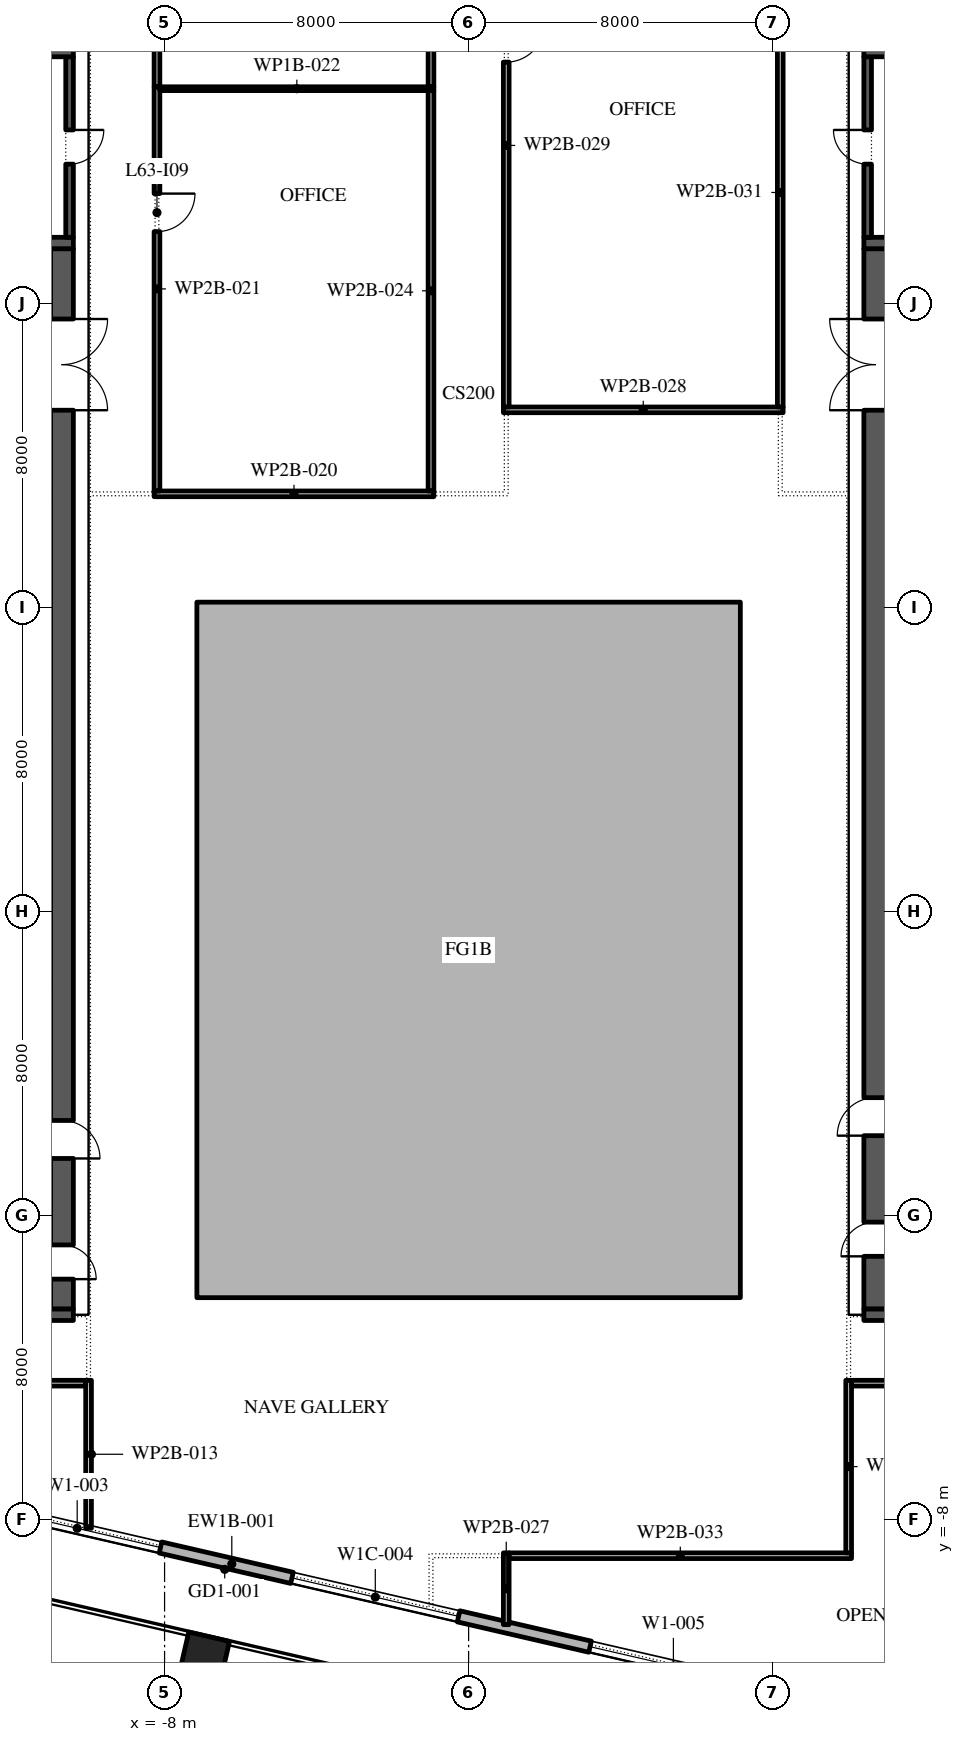
"""IFC4 building model, lengths in metres.
Left out: names, types, materials, properties, quantities, classifications, styles, units other than length and angle.
Written with IfcOpenShell. Run it as: python <this file> out.ifc"""

import sys

from ifc_helpers import new_model, si_unit, direction, frame, frame_2d, origin, origin_2d, place, context, subcontext, project, spatial, polyline, rectangle, outline, extrude, element, fill, save


model = new_model("IFC4")
c1 = context("Model", 3, precision=1e-05, world=origin(), true_north=direction((0.0, 1.0)))
c2 = subcontext(c1, "Body", "Model", "MODEL_VIEW")
j1 = project(units=[si_unit("LENGTHUNIT", "METRE"), si_unit("PLANEANGLEUNIT", "RADIAN")], contexts=[c1])
p1 = place(None, origin())
s1 = spatial("IfcSite", under=j1, at=p1, CompositionType="ELEMENT")
p2 = place(p1, origin())
s2 = spatial("IfcBuilding", under=s1, at=p2, CompositionType="ELEMENT")
p3 = place(p2, frame((0.0, 0.0, 289.2)))
s3 = spatial("IfcBuildingStorey", under=s2, at=p3, CompositionType="ELEMENT", Elevation=289.2)
p4 = place(p3, frame((-6.951, -11.608, 0.0), z_axis=(0.0, 0.0, 1.0), x_axis=(0.974370064785, -0.224951054344, 0.0)))
e1 = element("IfcColumn", 1, at=p4, inside=s3, PredefinedType="COLUMN", context=c2, shape_type="SweptSolid", body=[
    extrude(rectangle(XDim=1.1, YDim=1.1, at=origin_2d()), origin(), (0.0, 0.0, 1.0), 4.2),
])
p5 = place(p3, origin())
e2 = element("IfcWall", 2, at=p5, inside=s3, PredefinedType="STANDARD", context=c2, shape_type="SweptSolid", body=[
    extrude(outline(polyline([(-7.15, -2.15), (7.15, -2.15), (7.15, 16.15), (-7.15, 16.15), (-7.15, -2.15)]), holes=[polyline([(-7.0, -2.0), (-7.0, 16.0), (7.0, 16.0), (7.0, -2.0), (-7.0, -2.0)])]), origin(), (0.0, 0.0, 1.0), 3.95),
])
p6 = place(p3, frame((-29.616, -3.758, 0.0), z_axis=(0.0, 0.0, 1.0), x_axis=(0.974370532314, -0.224949029246, 0.0)))
e3 = element("IfcWall", 3, at=p6, inside=s3, PredefinedType="STANDARD", context=c2, shape_type="SweptSolid", body=[
    extrude(rectangle(XDim=48.0, YDim=0.3, at=frame_2d((24.0, 0.0))), origin(), (0.0, 0.0, 1.0), 3.95),
])
p7 = place(p6, frame((1.625, 0.0, 0.45)))
e4 = element("IfcOpeningElement", 4, at=p7, cuts=e3, PredefinedType="OPENING", context=c2, shape_type="SweptSolid", body=[
    extrude(rectangle(XDim=4.5, YDim=3.05, at=frame_2d((2.25, 1.525))), frame((0.0, 0.16, 0.0), z_axis=(0.0, -1.0, 0.0), x_axis=(1.0, 0.0, 0.0)), (0.0, 0.0, 1.0), 0.32),
])
p8 = place(p6, frame((10.575, 0.0, 0.0)))
e5 = element("IfcOpeningElement", 5, at=p8, cuts=e3, PredefinedType="OPENING", context=c2, shape_type="SweptSolid", body=[
    extrude(rectangle(XDim=2.4, YDim=3.5, at=frame_2d((1.2, 1.75))), frame((0.0, 0.16, 0.0), z_axis=(0.0, -1.0, 0.0), x_axis=(1.0, 0.0, 0.0)), (0.0, 0.0, 1.0), 0.32),
])
p9 = place(p6, frame((17.575, 0.0, 0.45)))
e6 = element("IfcOpeningElement", 6, at=p9, cuts=e3, PredefinedType="OPENING", context=c2, shape_type="SweptSolid", body=[
    extrude(rectangle(XDim=4.5, YDim=3.05, at=frame_2d((2.25, 1.525))), frame((0.0, 0.16, 0.0), z_axis=(0.0, -1.0, 0.0), x_axis=(1.0, 0.0, 0.0)), (0.0, 0.0, 1.0), 0.32),
])
p10 = place(p6, frame((25.625, 0.0, 0.45)))
e7 = element("IfcOpeningElement", 7, at=p10, cuts=e3, PredefinedType="OPENING", context=c2, shape_type="SweptSolid", body=[
    extrude(rectangle(XDim=4.5, YDim=2.9, at=frame_2d((2.25, 1.45))), frame((0.0, 0.16, 0.0), z_axis=(0.0, -1.0, 0.0), x_axis=(1.0, 0.0, 0.0)), (0.0, 0.0, 1.0), 0.32),
])
p11 = place(p6, frame((33.675, 0.0, 0.45)))
e8 = element("IfcOpeningElement", 8, at=p11, cuts=e3, PredefinedType="OPENING", context=c2, shape_type="SweptSolid", body=[
    extrude(rectangle(XDim=4.5, YDim=3.05, at=frame_2d((2.25, 1.525))), frame((0.0, 0.16, 0.0), z_axis=(0.0, -1.0, 0.0), x_axis=(1.0, 0.0, 0.0)), (0.0, 0.0, 1.0), 0.32),
])
p12 = place(p6, frame((42.775, 0.0, 0.0)))
e9 = element("IfcOpeningElement", 9, at=p12, cuts=e3, PredefinedType="OPENING", context=c2, shape_type="SweptSolid", body=[
    extrude(rectangle(XDim=2.4, YDim=3.15, at=frame_2d((1.2, 1.575))), frame((0.0, 0.16, 0.0), z_axis=(0.0, -1.0, 0.0), x_axis=(1.0, 0.0, 0.0)), (0.0, 0.0, 1.0), 0.32),
])
p13 = place(p3, frame((-10.7, -2.45, 0.0), z_axis=(0.0, 0.0, 1.0), x_axis=(0.0, 1.0, 0.0)))
e10 = element("IfcWall", 10, at=p13, inside=s3, PredefinedType="SHEAR", context=c2, shape_type="SweptSolid", body=[
    extrude(rectangle(XDim=27.9, YDim=0.6, at=frame_2d((13.95, 0.0))), origin(), (0.0, 0.0, 1.0), 3.95),
])
p14 = place(p13, frame((23.65, 0.0, 0.0)))
e11 = element("IfcOpeningElement", 11, at=p14, cuts=e10, PredefinedType="OPENING", context=c2, shape_type="SweptSolid", body=[
    extrude(rectangle(XDim=2.4, YDim=2.1, at=frame_2d((1.2, 1.05))), frame((0.0, 0.31, 0.0), z_axis=(0.0, -1.0, 0.0), x_axis=(1.0, 0.0, 0.0)), (0.0, 0.0, 1.0), 0.62),
])
p15 = place(p13, frame((0.788, 0.0, 0.0)))
e12 = element("IfcOpeningElement", 12, at=p15, cuts=e10, PredefinedType="OPENING", context=c2, shape_type="SweptSolid", body=[
    extrude(rectangle(XDim=0.9, YDim=2.1, at=frame_2d((0.45, 1.05))), frame((0.0, 0.31, 0.0), z_axis=(0.0, -1.0, 0.0), x_axis=(1.0, 0.0, 0.0)), (0.0, 0.0, 1.0), 0.62),
])
p16 = place(p13, frame((3.962, 0.0, 0.0)))
e13 = element("IfcOpeningElement", 13, at=p16, cuts=e10, PredefinedType="OPENING", context=c2, shape_type="SweptSolid", body=[
    extrude(rectangle(XDim=1.0, YDim=2.1, at=frame_2d((0.5, 1.05))), frame((0.0, 0.31, 0.0), z_axis=(0.0, -1.0, 0.0), x_axis=(1.0, 0.0, 0.0)), (0.0, 0.0, 1.0), 0.62),
])
for number, where, z_axis, x_axis in (
    (14, (-21.6, -2.6, 0.0), (0.0, 0.0, 1.0), (1.0, 0.0, 0.0)),
    (15, (-21.6, 25.6, 0.0), (0.0, 0.0, 1.0), (1.0, 0.0, 0.0)),
):
    element("IfcWall", number, at=place(p3, frame(where, z_axis=z_axis, x_axis=x_axis)), inside=s3, PredefinedType="SHEAR", context=c2, shape_type="SweptSolid", body=[
        extrude(rectangle(XDim=11.2, YDim=0.3, at=frame_2d((5.6, 0.0))), origin(), (0.0, 0.0, 1.0), 3.95),
    ])
p17 = place(p3, frame((-10.5, 25.75, 0.0), z_axis=(0.0, 0.0, 1.0), x_axis=(0.0, 1.0, 0.0)))
e16 = element("IfcWall", 16, at=p17, inside=s3, PredefinedType="SHEAR", context=c2, shape_type="SweptSolid", body=[
    extrude(rectangle(XDim=4.75, YDim=0.2, at=frame_2d((2.375, 0.0))), origin(), (0.0, 0.0, 1.0), 3.95),
])
p18 = place(p17, frame((1.925, 0.0, 0.0)))
e17 = element("IfcOpeningElement", 17, at=p18, cuts=e16, PredefinedType="OPENING", context=c2, shape_type="SweptSolid", body=[
    extrude(rectangle(XDim=0.9, YDim=2.1, at=frame_2d((0.45, 1.05))), frame((0.0, 0.11, 0.0), z_axis=(0.0, -1.0, 0.0), x_axis=(1.0, 0.0, 0.0)), (0.0, 0.0, 1.0), 0.22),
])
p19 = place(p3, frame((-21.6, 30.6, 0.0), z_axis=(0.0, 0.0, 1.0), x_axis=(1.0, 0.0, 0.0)))
e18 = element("IfcWall", 18, at=p19, inside=s3, PredefinedType="SHEAR", context=c2, shape_type="SweptSolid", body=[
    extrude(rectangle(XDim=11.2, YDim=0.2, at=frame_2d((5.6, 0.0))), origin(), (0.0, 0.0, 1.0), 3.95),
])
p20 = place(p3, frame((10.7, -2.45, 0.0), z_axis=(0.0, 0.0, 1.0), x_axis=(0.0, 1.0, 0.0)))
e19 = element("IfcWall", 19, at=p20, inside=s3, PredefinedType="SHEAR", context=c2, shape_type="SweptSolid", body=[
    extrude(rectangle(XDim=27.9, YDim=0.6, at=frame_2d((13.95, 0.0))), origin(), (0.0, 0.0, 1.0), 3.95),
])
p21 = place(p20, frame((23.65, 0.0, 0.0)))
e20 = element("IfcOpeningElement", 20, at=p21, cuts=e19, PredefinedType="OPENING", context=c2, shape_type="SweptSolid", body=[
    extrude(rectangle(XDim=2.4, YDim=2.1, at=frame_2d((1.2, 1.05))), frame((0.0, 0.31, 0.0), z_axis=(0.0, -1.0, 0.0), x_axis=(1.0, 0.0, 0.0)), (0.0, 0.0, 1.0), 0.62),
])
p22 = place(p20, frame((1.387, 0.0, 0.0)))
e21 = element("IfcOpeningElement", 21, at=p22, cuts=e19, PredefinedType="OPENING", context=c2, shape_type="SweptSolid", body=[
    extrude(rectangle(XDim=0.9, YDim=2.1, at=frame_2d((0.45, 1.05))), frame((0.0, 0.31, 0.0), z_axis=(0.0, -1.0, 0.0), x_axis=(1.0, 0.0, 0.0)), (0.0, 0.0, 1.0), 0.62),
])
p23 = place(p20, frame((4.562, 0.0, 0.0)))
e22 = element("IfcOpeningElement", 22, at=p23, cuts=e19, PredefinedType="OPENING", context=c2, shape_type="SweptSolid", body=[
    extrude(rectangle(XDim=1.0, YDim=2.1, at=frame_2d((0.5, 1.05))), frame((0.0, 0.31, 0.0), z_axis=(0.0, -1.0, 0.0), x_axis=(1.0, 0.0, 0.0)), (0.0, 0.0, 1.0), 0.62),
])
for number, where, z_axis, x_axis in (
    (23, (10.4, -2.6, 0.0), (0.0, 0.0, 1.0), (1.0, 0.0, 0.0)),
    (24, (10.4, 25.6, 0.0), (0.0, 0.0, 1.0), (1.0, 0.0, 0.0)),
):
    element("IfcWall", number, at=place(p3, frame(where, z_axis=z_axis, x_axis=x_axis)), inside=s3, PredefinedType="SHEAR", context=c2, shape_type="SweptSolid", body=[
        extrude(rectangle(XDim=11.2, YDim=0.3, at=frame_2d((5.6, 0.0))), origin(), (0.0, 0.0, 1.0), 3.95),
    ])
p24 = place(p3, frame((10.5, 25.75, 0.0), z_axis=(0.0, 0.0, 1.0), x_axis=(0.0, 1.0, 0.0)))
e25 = element("IfcWall", 25, at=p24, inside=s3, PredefinedType="SHEAR", context=c2, shape_type="SweptSolid", body=[
    extrude(rectangle(XDim=4.75, YDim=0.2, at=frame_2d((2.375, 0.0))), origin(), (0.0, 0.0, 1.0), 3.95),
])
p25 = place(p24, frame((1.925, 0.0, 0.0)))
e26 = element("IfcOpeningElement", 26, at=p25, cuts=e25, PredefinedType="OPENING", context=c2, shape_type="SweptSolid", body=[
    extrude(rectangle(XDim=0.9, YDim=2.1, at=frame_2d((0.45, 1.05))), frame((0.0, 0.11, 0.0), z_axis=(0.0, -1.0, 0.0), x_axis=(1.0, 0.0, 0.0)), (0.0, 0.0, 1.0), 0.22),
])
p26 = place(p3, frame((10.4, 30.6, 0.0), z_axis=(0.0, 0.0, 1.0), x_axis=(1.0, 0.0, 0.0)))
e27 = element("IfcWall", 27, at=p26, inside=s3, PredefinedType="SHEAR", context=c2, shape_type="SweptSolid", body=[
    extrude(rectangle(XDim=11.2, YDim=0.2, at=frame_2d((5.6, 0.0))), origin(), (0.0, 0.0, 1.0), 3.95),
])
p27 = place(p3, frame((-10.0, -8.216, 0.0), z_axis=(0.0, 0.0, 1.0), x_axis=(0.0, 1.0, 0.0)))
e28 = element("IfcWall", 28, at=p27, inside=s3, PredefinedType="PARTITIONING", context=c2, shape_type="SweptSolid", body=[
    extrude(rectangle(XDim=3.891, YDim=0.15, at=frame_2d((1.946, 0.0))), origin(), (0.0, 0.0, 1.0), 3.95),
])
p28 = place(p3, frame((-10.075, -4.4, 0.0), z_axis=(0.0, 0.0, 1.0), x_axis=(-1.0, 0.0, 0.0)))
e29 = element("IfcWall", 29, at=p28, inside=s3, PredefinedType="PARTITIONING", context=c2, shape_type="SweptSolid", body=[
    extrude(rectangle(XDim=11.88, YDim=0.15, at=frame_2d((5.94, 0.0))), origin(), (0.0, 0.0, 1.0), 3.95),
])
p29 = place(p28, frame((5.555, 0.0, 0.0)))
e30 = element("IfcOpeningElement", 30, at=p29, cuts=e29, PredefinedType="OPENING", context=c2, shape_type="SweptSolid", body=[
    extrude(rectangle(XDim=1.0, YDim=2.1, at=frame_2d((0.5, 1.05))), frame((0.0, 0.085, 0.0), z_axis=(0.0, -1.0, 0.0), x_axis=(1.0, 0.0, 0.0)), (0.0, 0.0, 1.0), 0.17),
])
p30 = place(p3, frame((-8.275, 19.0, 0.0), z_axis=(0.0, 0.0, 1.0), x_axis=(1.0, 0.0, 0.0)))
e31 = element("IfcWall", 31, at=p30, inside=s3, PredefinedType="PARTITIONING", context=c2, shape_type="SweptSolid", body=[
    extrude(rectangle(XDim=7.36, YDim=0.15, at=frame_2d((3.68, 0.0))), origin(), (0.0, 0.0, 1.0), 3.95),
])
p31 = place(p3, frame((-8.2, 29.71, 0.0), z_axis=(0.0, 0.0, 1.0), x_axis=(0.0, -1.0, 0.0)))
e32 = element("IfcWall", 32, at=p31, inside=s3, PredefinedType="PARTITIONING", context=c2, shape_type="SweptSolid", body=[
    extrude(rectangle(XDim=10.635, YDim=0.15, at=frame_2d((5.317, 0.0))), origin(), (0.0, 0.0, 1.0), 3.95),
])
p32 = place(p31, frame((2.81, 0.0, 0.0)))
e33 = element("IfcOpeningElement", 33, at=p32, cuts=e32, PredefinedType="OPENING", context=c2, shape_type="SweptSolid", body=[
    extrude(rectangle(XDim=1.0, YDim=2.1, at=frame_2d((0.5, 1.05))), frame((0.0, 0.085, 0.0), z_axis=(0.0, -1.0, 0.0), x_axis=(1.0, 0.0, 0.0)), (0.0, 0.0, 1.0), 0.17),
])
p33 = place(p3, frame((-8.125, 29.66, 0.0), z_axis=(0.0, 0.0, 1.0), x_axis=(1.0, 0.0, 0.0)))
e34 = element("IfcWall", 34, at=p33, inside=s3, PredefinedType="PARTITIONING", context=c2, shape_type="SweptSolid", body=[
    extrude(rectangle(XDim=7.21, YDim=0.1, at=frame_2d((3.605, 0.0))), origin(), (0.0, 0.0, 1.0), 3.95),
])
p34 = place(p3, frame((-8.2, 32.425, 0.0), z_axis=(0.0, 0.0, 1.0), x_axis=(0.0, -1.0, 0.0)))
e35 = element("IfcWall", 35, at=p34, inside=s3, PredefinedType="PARTITIONING", context=c2, shape_type="SweptSolid", body=[
    extrude(rectangle(XDim=2.715, YDim=0.15, at=frame_2d((1.357, 0.0))), origin(), (0.0, 0.0, 1.0), 3.95),
])
p35 = place(p3, frame((-0.99, 19.075, 0.0), z_axis=(0.0, 0.0, 1.0), x_axis=(0.0, 1.0, 0.0)))
e36 = element("IfcWall", 36, at=p35, inside=s3, PredefinedType="PARTITIONING", context=c2, shape_type="SweptSolid", body=[
    extrude(rectangle(XDim=10.535, YDim=0.15, at=frame_2d((5.268, 0.0))), origin(), (0.0, 0.0, 1.0), 3.95),
])
p36 = place(p3, frame((-0.99, 29.71, 0.0), z_axis=(0.0, 0.0, 1.0), x_axis=(0.0, 1.0, 0.0)))
e37 = element("IfcWall", 37, at=p36, inside=s3, PredefinedType="PARTITIONING", context=c2, shape_type="SweptSolid", body=[
    extrude(rectangle(XDim=12.24, YDim=0.15, at=frame_2d((6.12, 0.0))), origin(), (0.0, 0.0, 1.0), 3.95),
])
p37 = place(p36, frame((4.39, 0.0, 0.0)))
e38 = element("IfcOpeningElement", 38, at=p37, cuts=e37, PredefinedType="OPENING", context=c2, shape_type="SweptSolid", body=[
    extrude(rectangle(XDim=1.0, YDim=2.1, at=frame_2d((0.5, 1.05))), frame((0.0, 0.085, 0.0), z_axis=(0.0, -1.0, 0.0), x_axis=(1.0, 0.0, 0.0)), (0.0, 0.0, 1.0), 0.17),
])
p38 = place(p3, frame((0.99, -8.865, 0.0), z_axis=(0.0, 0.0, 1.0), x_axis=(0.0, -1.0, 0.0)))
e39 = element("IfcWall", 39, at=p38, inside=s3, PredefinedType="PARTITIONING", context=c2, shape_type="SweptSolid", body=[
    extrude(rectangle(XDim=1.888, YDim=0.15, at=frame_2d((0.944, 0.0))), origin(), (0.0, 0.0, 1.0), 3.95),
])
p39 = place(p3, frame((0.915, 21.21, 0.0), z_axis=(0.0, 0.0, 1.0), x_axis=(1.0, 0.0, 0.0)))
e40 = element("IfcWall", 40, at=p39, inside=s3, PredefinedType="PARTITIONING", context=c2, shape_type="SweptSolid", body=[
    extrude(rectangle(XDim=7.36, YDim=0.15, at=frame_2d((3.68, 0.0))), origin(), (0.0, 0.0, 1.0), 3.95),
])
p40 = place(p3, frame((0.99, 35.05, 0.0), z_axis=(0.0, 0.0, 1.0), x_axis=(0.0, -1.0, 0.0)))
e41 = element("IfcWall", 41, at=p40, inside=s3, PredefinedType="PARTITIONING", context=c2, shape_type="SweptSolid", body=[
    extrude(rectangle(XDim=13.765, YDim=0.15, at=frame_2d((6.883, 0.0))), origin(), (0.0, 0.0, 1.0), 3.95),
])
p41 = place(p40, frame((3.69, 0.0, 0.0)))
e42 = element("IfcOpeningElement", 42, at=p41, cuts=e41, PredefinedType="OPENING", context=c2, shape_type="SweptSolid", body=[
    extrude(rectangle(XDim=1.0, YDim=2.1, at=frame_2d((0.5, 1.05))), frame((0.0, 0.085, 0.0), z_axis=(0.0, -1.0, 0.0), x_axis=(1.0, 0.0, 0.0)), (0.0, 0.0, 1.0), 0.17),
])
p42 = place(p3, frame((8.2, 21.285, 0.0), z_axis=(0.0, 0.0, 1.0), x_axis=(0.0, 1.0, 0.0)))
e43 = element("IfcWall", 43, at=p42, inside=s3, PredefinedType="PARTITIONING", context=c2, shape_type="SweptSolid", body=[
    extrude(rectangle(XDim=11.29, YDim=0.15, at=frame_2d((5.645, 0.0))), origin(), (0.0, 0.0, 1.0), 3.95),
])
p43 = place(p3, frame((10.075, -8.94, 0.0), z_axis=(0.0, 0.0, 1.0), x_axis=(-1.0, 0.0, 0.0)))
e44 = element("IfcWall", 44, at=p43, inside=s3, PredefinedType="PARTITIONING", context=c2, shape_type="SweptSolid", body=[
    extrude(rectangle(XDim=9.01, YDim=0.15, at=frame_2d((4.505, 0.0))), origin(), (0.0, 0.0, 1.0), 3.95),
])
p44 = place(p3, frame((10.0, -4.325, 0.0), z_axis=(0.0, 0.0, 1.0), x_axis=(0.0, -1.0, 0.0)))
e45 = element("IfcWall", 45, at=p44, inside=s3, PredefinedType="PARTITIONING", context=c2, shape_type="SweptSolid", body=[
    extrude(rectangle(XDim=4.54, YDim=0.15, at=frame_2d((2.27, 0.0))), origin(), (0.0, 0.0, 1.0), 3.95),
])
p45 = place(p3, frame((22.968, -4.4, 0.0), z_axis=(0.0, 0.0, 1.0), x_axis=(-1.0, 0.0, 0.0)))
e46 = element("IfcWall", 46, at=p45, inside=s3, PredefinedType="PARTITIONING", context=c2, shape_type="SweptSolid", body=[
    extrude(rectangle(XDim=12.893, YDim=0.15, at=frame_2d((6.447, 0.0))), origin(), (0.0, 0.0, 1.0), 3.95),
])
p46 = place(p45, frame((3.318, 0.0, 0.0)))
e47 = element("IfcOpeningElement", 47, at=p46, cuts=e46, PredefinedType="OPENING", context=c2, shape_type="SweptSolid", body=[
    extrude(rectangle(XDim=1.0, YDim=2.1, at=frame_2d((0.5, 1.05))), frame((0.0, 0.085, 0.0), z_axis=(0.0, -1.0, 0.0), x_axis=(1.0, 0.0, 0.0)), (0.0, 0.0, 1.0), 0.17),
])
p47 = place(p9, origin())
e48 = element("IfcWindow", 48, at=p47, inside=s3, PartitioningType="DOUBLE_PANEL_VERTICAL", PredefinedType="WINDOW", context=c2, shape_type="SweptSolid", body=[
    extrude(rectangle(XDim=4.5, YDim=3.05, at=frame_2d((2.25, 1.525))), frame((0.0, 0.03, 0.0), z_axis=(0.0, -1.0, 0.0), x_axis=(1.0, 0.0, 0.0)), (0.0, 0.0, 1.0), 0.06),
])
fill(e6, e48)
p48 = place(p10, origin())
e49 = element("IfcWindow", 49, at=p48, inside=s3, PartitioningType="DOUBLE_PANEL_VERTICAL", PredefinedType="WINDOW", context=c2, shape_type="SweptSolid", body=[
    extrude(rectangle(XDim=4.5, YDim=2.9, at=frame_2d((2.25, 1.45))), frame((0.0, 0.03, 0.0), z_axis=(0.0, -1.0, 0.0), x_axis=(1.0, 0.0, 0.0)), (0.0, 0.0, 1.0), 0.06),
])
fill(e7, e49)
p49 = place(p11, origin())
e50 = element("IfcWindow", 50, at=p49, inside=s3, PartitioningType="DOUBLE_PANEL_VERTICAL", PredefinedType="WINDOW", context=c2, shape_type="SweptSolid", body=[
    extrude(rectangle(XDim=4.5, YDim=3.05, at=frame_2d((2.25, 1.525))), frame((0.0, 0.03, 0.0), z_axis=(0.0, -1.0, 0.0), x_axis=(1.0, 0.0, 0.0)), (0.0, 0.0, 1.0), 0.06),
])
fill(e8, e50)
p50 = place(p14, frame((2.4, 0.0, 0.0), z_axis=(0.0, 0.0, 1.0), x_axis=(-1.0, 0.0, 0.0)))
e51 = element("IfcDoor", 51, at=p50, inside=s3, OperationType="DOUBLE_DOOR_SINGLE_SWING", PredefinedType="DOOR", context=c2, shape_type="SweptSolid", body=[
    extrude(rectangle(XDim=2.4, YDim=2.1, at=frame_2d((1.2, 1.05))), frame((0.0, 0.025, 0.0), z_axis=(0.0, -1.0, 0.0), x_axis=(1.0, 0.0, 0.0)), (0.0, 0.0, 1.0), 0.05),
])
fill(e11, e51)
p51 = place(p18, frame((0.9, 0.15, 0.0), z_axis=(0.0, 0.0, 1.0), x_axis=(-1.0, 0.0, 0.0)))
e52 = element("IfcDoor", 52, at=p51, inside=s3, OperationType="SINGLE_SWING_RIGHT", PredefinedType="DOOR", context=c2, shape_type="SweptSolid", body=[
    extrude(rectangle(XDim=0.9, YDim=2.1, at=frame_2d((0.45, 1.05))), frame((0.0, 0.1, 0.0), z_axis=(0.0, -1.0, 0.0), x_axis=(1.0, 0.0, 0.0)), (0.0, 0.0, 1.0), 0.05),
])
fill(e17, e52)
p52 = place(p21, origin())
e53 = element("IfcDoor", 53, at=p52, inside=s3, OperationType="DOUBLE_DOOR_SINGLE_SWING", PredefinedType="DOOR", context=c2, shape_type="SweptSolid", body=[
    extrude(rectangle(XDim=2.4, YDim=2.1, at=frame_2d((1.2, 1.05))), frame((0.0, 0.025, 0.0), z_axis=(0.0, -1.0, 0.0), x_axis=(1.0, 0.0, 0.0)), (0.0, 0.0, 1.0), 0.05),
])
fill(e20, e53)
p53 = place(p25, origin())
e54 = element("IfcDoor", 54, at=p53, inside=s3, OperationType="SINGLE_SWING_LEFT", PredefinedType="DOOR", context=c2, shape_type="SweptSolid", body=[
    extrude(rectangle(XDim=0.9, YDim=2.1, at=frame_2d((0.45, 1.05))), frame((0.0, -0.05, 0.0), z_axis=(0.0, -1.0, 0.0), x_axis=(1.0, 0.0, 0.0)), (0.0, 0.0, 1.0), 0.05),
])
fill(e26, e54)
p54 = place(p41, origin())
e55 = element("IfcDoor", 55, at=p54, inside=s3, OperationType="SINGLE_SWING_RIGHT", PredefinedType="DOOR", context=c2, shape_type="SweptSolid", body=[
    extrude(rectangle(XDim=1.0, YDim=2.1, at=frame_2d((0.5, 1.05))), frame((0.0, 0.025, 0.0), z_axis=(0.0, -1.0, 0.0), x_axis=(1.0, 0.0, 0.0)), (0.0, 0.0, 1.0), 0.05),
])
fill(e42, e55)
p55 = place(p32, origin())
e56 = element("IfcDoor", 56, at=p55, inside=s3, OperationType="SINGLE_SWING_RIGHT", PredefinedType="DOOR", context=c2, shape_type="SweptSolid", body=[
    extrude(rectangle(XDim=1.0, YDim=2.1, at=frame_2d((0.5, 1.05))), frame((0.0, 0.025, 0.0), z_axis=(0.0, -1.0, 0.0), x_axis=(1.0, 0.0, 0.0)), (0.0, 0.0, 1.0), 0.05),
])
fill(e33, e56)
save(model, sys.argv[1])
